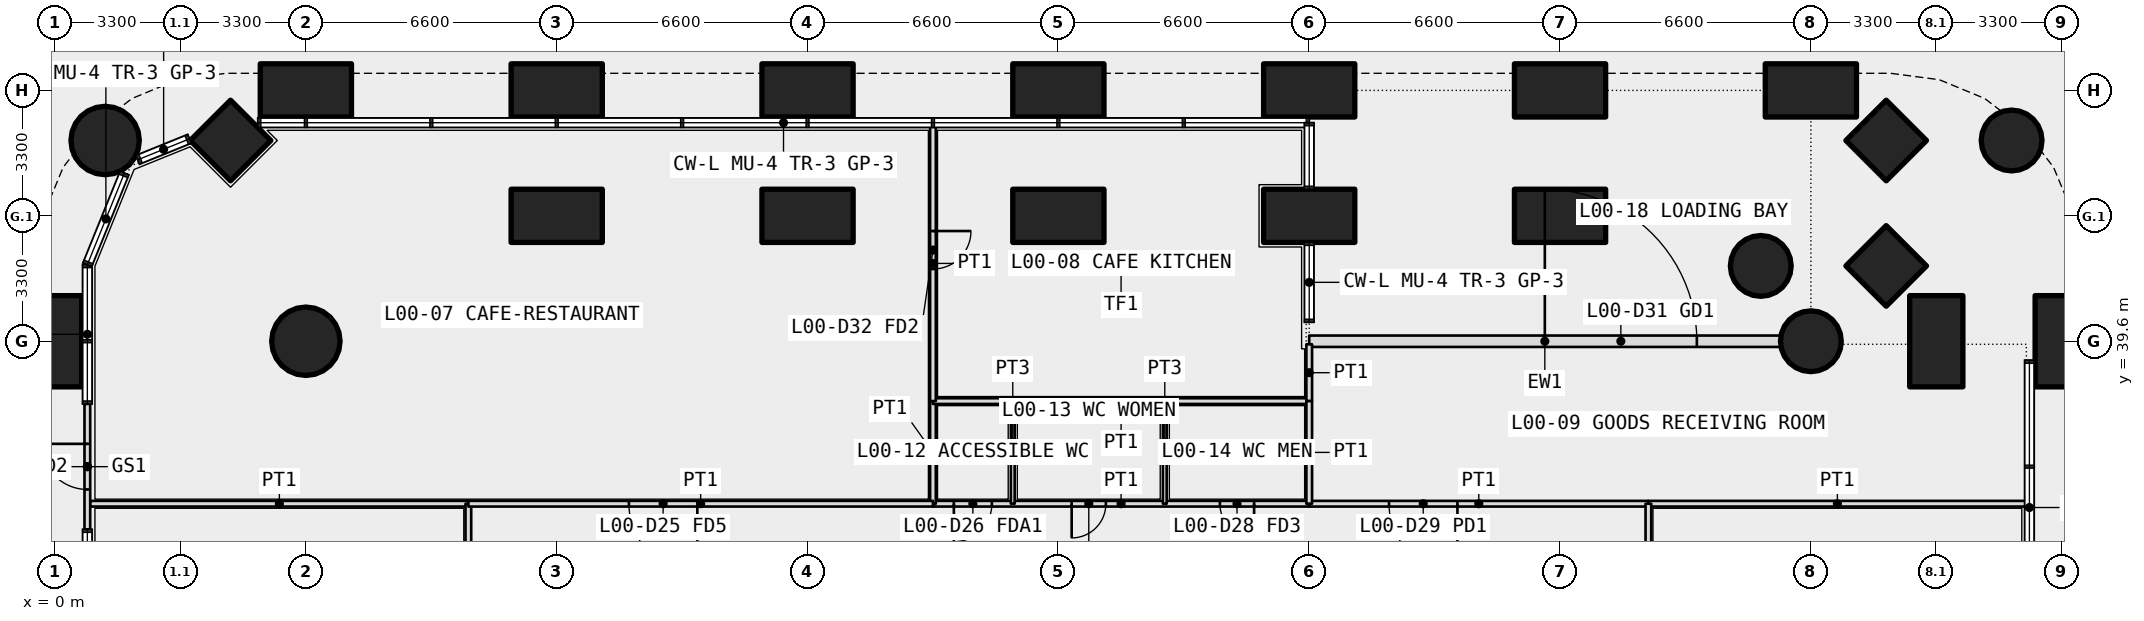
"""IFC4 building model, lengths in metres.
Left out: names, types, materials, properties, quantities, classifications, styles, units other than length and angle.
Written with IfcOpenShell. Run it as: python <this file> out.ifc"""

import sys

from ifc_helpers import new_model, si_unit, direction, frame, frame_2d, origin, origin_2d, place, context, subcontext, project, spatial, rectangle, circle, extrude, element, fill, save


model = new_model("IFC4")
c1 = context("Model", 3, precision=1e-05, world=origin(), true_north=direction((0.0, 1.0)))
c2 = subcontext(c1, "Body", "Model", "MODEL_VIEW")
j1 = project(units=[si_unit("LENGTHUNIT", "METRE"), si_unit("PLANEANGLEUNIT", "RADIAN")], contexts=[c1])
p1 = place(None, origin())
s1 = spatial("IfcSite", under=j1, at=p1, CompositionType="ELEMENT")
p2 = place(p1, origin())
s2 = spatial("IfcBuilding", under=s1, at=p2, CompositionType="ELEMENT")
p3 = place(p2, origin())
s3 = spatial("IfcBuildingStorey", under=s2, at=p3, CompositionType="ELEMENT", Elevation=0.0)
p4 = place(p3, frame((1.318, 44.882, 0.0), z_axis=(0.0, 0.0, 1.0), x_axis=(1.0, 0.0, 0.0)))
e1 = element("IfcColumn", 1, at=p4, inside=s3, PredefinedType="COLUMN", context=c2, shape_type="SweptSolid", body=[
    extrude(circle(Radius=0.9, at=origin_2d()), origin(), (0.0, 0.0, 1.0), 7.2),
])
p5 = place(p3, frame((51.482, 44.882, 0.0), z_axis=(0.0, 0.0, 1.0), x_axis=(1.0, 0.0, 0.0)))
e2 = element("IfcColumn", 2, at=p5, inside=s3, PredefinedType="COLUMN", context=c2, shape_type="SweptSolid", body=[
    extrude(circle(Radius=0.8, at=origin_2d()), origin(), (0.0, 0.0, 1.0), 7.2),
])
for number, where, z_axis, x_axis in (
    (3, (0.0, 39.6, 0.0), (0.0, 0.0, 1.0), (0.0, 1.0, 0.0)),
    (4, (52.8, 39.6, 0.0), (0.0, 0.0, 1.0), (0.0, 1.0, 0.0)),
    (5, (6.6, 46.2, 0.0), (0.0, 0.0, 1.0), (1.0, 0.0, 0.0)),
    (6, (13.2, 46.2, 0.0), (0.0, 0.0, 1.0), (1.0, 0.0, 0.0)),
    (7, (19.8, 46.2, 0.0), (0.0, 0.0, 1.0), (1.0, 0.0, 0.0)),
    (8, (26.4, 46.2, 0.0), (0.0, 0.0, 1.0), (1.0, 0.0, 0.0)),
    (9, (33.0, 46.2, 0.0), (0.0, 0.0, 1.0), (1.0, 0.0, 0.0)),
    (10, (39.6, 46.2, 0.0), (0.0, 0.0, 1.0), (1.0, 0.0, 0.0)),
    (11, (46.2, 46.2, 0.0), (0.0, 0.0, 1.0), (1.0, 0.0, 0.0)),
):
    element("IfcColumn", number, at=place(p3, frame(where, z_axis=z_axis, x_axis=x_axis)), inside=s3, PredefinedType="COLUMN", context=c2, shape_type="SweptSolid", body=[
        extrude(rectangle(XDim=2.4, YDim=1.4, at=origin_2d()), origin(), (0.0, 0.0, 1.0), 7.2),
    ])
p6 = place(p3, frame((6.6, 39.6, 0.0), z_axis=(0.0, 0.0, 1.0), x_axis=(1.0, 0.0, 0.0)))
e12 = element("IfcColumn", 12, at=p6, inside=s3, PredefinedType="COLUMN", context=c2, shape_type="SweptSolid", body=[
    extrude(circle(Radius=0.9, at=origin_2d()), origin(), (0.0, 0.0, 1.0), 7.2),
])
p7 = place(p3, frame((46.2, 39.6, 0.0), z_axis=(0.0, 0.0, 1.0), x_axis=(1.0, 0.0, 0.0)))
e13 = element("IfcColumn", 13, at=p7, inside=s3, PredefinedType="COLUMN", context=c2, shape_type="SweptSolid", body=[
    extrude(circle(Radius=0.8, at=origin_2d()), origin(), (0.0, 0.0, 1.0), 7.2),
])
for number, where, z_axis, x_axis in (
    (14, (4.618, 44.882, 0.0), (0.0, 0.0, 1.0), (0.707, 0.707, 0.0)),
    (15, (48.182, 44.882, 0.0), (0.0, 0.0, 1.0), (0.707, 0.707, 0.0)),
):
    element("IfcColumn", number, at=place(p3, frame(where, z_axis=z_axis, x_axis=x_axis)), inside=s3, PredefinedType="COLUMN", context=c2, shape_type="SweptSolid", body=[
        extrude(rectangle(XDim=1.5, YDim=1.5, at=origin_2d()), origin(), (0.0, 0.0, 1.0), 7.2),
    ])
p8 = place(p3, frame((49.5, 39.6, 0.0), z_axis=(0.0, 0.0, 1.0), x_axis=(0.0, 1.0, 0.0)))
e16 = element("IfcColumn", 16, at=p8, inside=s3, PredefinedType="COLUMN", context=c2, shape_type="SweptSolid", body=[
    extrude(rectangle(XDim=2.4, YDim=1.4, at=origin_2d()), origin(), (0.0, 0.0, 1.0), 7.2),
])
p9 = place(p3, frame((48.182, 41.582, 0.0), z_axis=(0.0, 0.0, 1.0), x_axis=(0.707106781187, 0.707106781187, 0.0)))
e17 = element("IfcColumn", 17, at=p9, inside=s3, PredefinedType="COLUMN", context=c2, shape_type="SweptSolid", body=[
    extrude(rectangle(XDim=1.5, YDim=1.5, at=origin_2d()), origin(), (0.0, 0.0, 1.0), 7.2),
])
for number, where, z_axis, x_axis in (
    (18, (13.2, 42.9, 0.0), (0.0, 0.0, 1.0), (1.0, 0.0, 0.0)),
    (19, (19.8, 42.9, 0.0), (0.0, 0.0, 1.0), (1.0, 0.0, 0.0)),
    (20, (26.4, 42.9, 0.0), (0.0, 0.0, 1.0), (1.0, 0.0, 0.0)),
    (21, (33.0, 42.9, 0.0), (0.0, 0.0, 1.0), (1.0, 0.0, 0.0)),
    (22, (39.6, 42.9, 0.0), (0.0, 0.0, 1.0), (1.0, 0.0, 0.0)),
):
    element("IfcColumn", number, at=place(p3, frame(where, z_axis=z_axis, x_axis=x_axis)), inside=s3, PredefinedType="COLUMN", context=c2, shape_type="SweptSolid", body=[
        extrude(rectangle(XDim=2.4, YDim=1.4, at=origin_2d()), origin(), (0.0, 0.0, 1.0), 7.2),
    ])
p10 = place(p3, frame((44.882, 41.582, 0.0), z_axis=(0.0, 0.0, 1.0), x_axis=(1.0, 0.0, 0.0)))
e23 = element("IfcColumn", 23, at=p10, inside=s3, PredefinedType="COLUMN", context=c2, shape_type="SweptSolid", body=[
    extrude(circle(Radius=0.8, at=origin_2d()), origin(), (0.0, 0.0, 1.0), 7.2),
])
p11 = place(p3, frame((0.85, 34.65, 0.0), z_axis=(0.0, 0.0, 1.0), x_axis=(0.0, 1.0, 0.0)))
e24 = element("IfcWall", 24, at=p11, inside=s3, PredefinedType="SOLIDWALL", context=c2, shape_type="SweptSolid", body=[
    extrude(rectangle(XDim=3.3, YDim=0.15, at=frame_2d((1.65, 0.0))), origin(), (0.0, 0.0, 1.0), 6.9),
])
p12 = place(p11, frame((1.05, 0.0, 0.0)))
e25 = element("IfcOpeningElement", 25, at=p12, cuts=e24, PredefinedType="OPENING", context=c2, shape_type="SweptSolid", body=[
    extrude(rectangle(XDim=1.2, YDim=2.4, at=frame_2d((0.6, 1.2))), frame((0.0, 0.085, 0.0), z_axis=(0.0, -1.0, 0.0), x_axis=(1.0, 0.0, 0.0)), (0.0, 0.0, 1.0), 0.17),
])
p13 = place(p3, frame((33.0, 39.6, 0.0), z_axis=(0.0, 0.0, 1.0), x_axis=(1.0, 0.0, 0.0)))
e26 = element("IfcWall", 26, at=p13, inside=s3, PredefinedType="SOLIDWALL", context=c2, shape_type="SweptSolid", body=[
    extrude(rectangle(XDim=12.4, YDim=0.3, at=frame_2d((6.2, 0.0))), origin(), (0.0, 0.0, 1.0), 5.85),
])
p14 = place(p13, frame((6.2, 0.0, 0.0)))
e27 = element("IfcOpeningElement", 27, at=p14, cuts=e26, PredefinedType="OPENING", context=c2, shape_type="SweptSolid", body=[
    extrude(rectangle(XDim=4.0, YDim=4.5, at=frame_2d((2.0, 2.25))), frame((0.0, 0.16, 0.0), z_axis=(0.0, -1.0, 0.0), x_axis=(1.0, 0.0, 0.0)), (0.0, 0.0, 1.0), 0.32),
])
p15 = place(p3, frame((33.0, 35.325, 0.0), z_axis=(0.0, 0.0, 1.0), x_axis=(-1.0, 0.0, 0.0)))
e28 = element("IfcWall", 28, at=p15, inside=s3, PredefinedType="PARTITIONING", context=c2, shape_type="SweptSolid", body=[
    extrude(rectangle(XDim=9.9, YDim=0.15, at=frame_2d((4.95, 0.0))), origin(), (0.0, 0.0, 1.0), 5.85),
])
p16 = place(p15, frame((8.35, 0.0, 0.0)))
e29 = element("IfcOpeningElement", 29, at=p16, cuts=e28, PredefinedType="OPENING", context=c2, shape_type="SweptSolid", body=[
    extrude(rectangle(XDim=1.0, YDim=2.1, at=frame_2d((0.5, 1.05))), frame((0.0, 0.085, 0.0), z_axis=(0.0, -1.0, 0.0), x_axis=(1.0, 0.0, 0.0)), (0.0, 0.0, 1.0), 0.17),
])
p17 = place(p15, frame((5.35, 0.0, 0.0)))
e30 = element("IfcOpeningElement", 30, at=p17, cuts=e28, PredefinedType="OPENING", context=c2, shape_type="SweptSolid", body=[
    extrude(rectangle(XDim=0.9, YDim=2.1, at=frame_2d((0.45, 1.05))), frame((0.0, 0.085, 0.0), z_axis=(0.0, -1.0, 0.0), x_axis=(1.0, 0.0, 0.0)), (0.0, 0.0, 1.0), 0.17),
])
p18 = place(p15, frame((1.45, 0.0, 0.0)))
e31 = element("IfcOpeningElement", 31, at=p18, cuts=e28, PredefinedType="OPENING", context=c2, shape_type="SweptSolid", body=[
    extrude(rectangle(XDim=0.9, YDim=2.1, at=frame_2d((0.45, 1.05))), frame((0.0, 0.085, 0.0), z_axis=(0.0, -1.0, 0.0), x_axis=(1.0, 0.0, 0.0)), (0.0, 0.0, 1.0), 0.17),
])
for number, where, z_axis, x_axis in (
    (32, (25.2, 35.325, 0.0), (0.0, 0.0, 1.0), (0.0, 1.0, 0.0)),
    (33, (29.2, 35.325, 0.0), (0.0, 0.0, 1.0), (0.0, 1.0, 0.0)),
):
    element("IfcWall", number, at=place(p3, frame(where, z_axis=z_axis, x_axis=x_axis)), inside=s3, PredefinedType="PARTITIONING", context=c2, shape_type="SweptSolid", body=[
        extrude(rectangle(XDim=2.7, YDim=0.1, at=frame_2d((1.35, 0.0))), origin(), (0.0, 0.0, 1.0), 6.9),
    ])
p19 = place(p3, frame((0.93, 35.325, 0.0), z_axis=(0.0, 0.0, 1.0), x_axis=(1.0, 0.0, 0.0)))
e34 = element("IfcWall", 34, at=p19, inside=s3, PredefinedType="PARTITIONING", context=c2, shape_type="SweptSolid", body=[
    extrude(rectangle(XDim=9.945, YDim=0.15, at=frame_2d((4.973, 0.0))), origin(), (0.0, 0.0, 1.0), 5.85),
])
p20 = place(p3, frame((10.875, 35.325, 0.0), z_axis=(0.0, 0.0, 1.0), x_axis=(0.0, -1.0, 0.0)))
e35 = element("IfcWall", 35, at=p20, inside=s3, PredefinedType="PARTITIONING", context=c2, shape_type="SweptSolid", body=[
    extrude(rectangle(XDim=8.925, YDim=0.15, at=frame_2d((4.462, 0.0))), origin(), (0.0, 0.0, 1.0), 5.85),
])
p21 = place(p20, frame((3.825, 0.0, 0.0)))
e36 = element("IfcOpeningElement", 36, at=p21, cuts=e35, PredefinedType="OPENING", context=c2, shape_type="SweptSolid", body=[
    extrude(rectangle(XDim=1.0, YDim=2.1, at=frame_2d((0.5, 1.05))), frame((0.0, 0.085, 0.0), z_axis=(0.0, -1.0, 0.0), x_axis=(1.0, 0.0, 0.0)), (0.0, 0.0, 1.0), 0.17),
])
p22 = place(p3, frame((23.1, 38.025, 0.0), z_axis=(0.0, 0.0, 1.0), x_axis=(0.0, -1.0, 0.0)))
e37 = element("IfcWall", 37, at=p22, inside=s3, PredefinedType="PARTITIONING", context=c2, shape_type="SweptSolid", body=[
    extrude(rectangle(XDim=2.7, YDim=0.15, at=frame_2d((1.35, 0.0))), origin(), (0.0, 0.0, 1.0), 6.9),
])
p23 = place(p3, frame((23.1, 35.325, 0.0), z_axis=(0.0, 0.0, 1.0), x_axis=(-1.0, 0.0, 0.0)))
e38 = element("IfcWall", 38, at=p23, inside=s3, PredefinedType="PARTITIONING", context=c2, shape_type="SweptSolid", body=[
    extrude(rectangle(XDim=12.225, YDim=0.15, at=frame_2d((6.113, 0.0))), origin(), (0.0, 0.0, 1.0), 4.5),
])
p24 = place(p23, frame((6.2, 0.0, 0.0)))
e39 = element("IfcOpeningElement", 39, at=p24, cuts=e38, PredefinedType="OPENING", context=c2, shape_type="SweptSolid", body=[
    extrude(rectangle(XDim=1.8, YDim=2.1, at=frame_2d((0.9, 1.05))), frame((0.0, 0.085, 0.0), z_axis=(0.0, -1.0, 0.0), x_axis=(1.0, 0.0, 0.0)), (0.0, 0.0, 1.0), 0.17),
])
p25 = place(p3, frame((33.0, 38.025, 0.0), z_axis=(0.0, 0.0, 1.0), x_axis=(-1.0, 0.0, 0.0)))
e40 = element("IfcWall", 40, at=p25, inside=s3, PredefinedType="PARTITIONING", context=c2, shape_type="SweptSolid", body=[
    extrude(rectangle(XDim=9.9, YDim=0.15, at=frame_2d((4.95, 0.0))), origin(), (0.0, 0.0, 1.0), 5.85),
])
p26 = place(p3, frame((23.1, 45.27, 0.0), z_axis=(0.0, 0.0, 1.0), x_axis=(0.0, -1.0, 0.0)))
e41 = element("IfcWall", 41, at=p26, inside=s3, PredefinedType="PARTITIONING", context=c2, shape_type="SweptSolid", body=[
    extrude(rectangle(XDim=7.245, YDim=0.15, at=frame_2d((3.623, 0.0))), origin(), (0.0, 0.0, 1.0), 6.9),
])
p27 = place(p26, frame((2.77, 0.0, 0.0)))
e42 = element("IfcOpeningElement", 42, at=p27, cuts=e41, PredefinedType="OPENING", context=c2, shape_type="SweptSolid", body=[
    extrude(rectangle(XDim=1.0, YDim=2.1, at=frame_2d((0.5, 1.05))), frame((0.0, 0.085, 0.0), z_axis=(0.0, -1.0, 0.0), x_axis=(1.0, 0.0, 0.0)), (0.0, 0.0, 1.0), 0.17),
])
p28 = place(p3, frame((33.0, 39.52, 0.0), z_axis=(0.0, 0.0, 1.0), x_axis=(0.0, -1.0, 0.0)))
e43 = element("IfcWall", 43, at=p28, inside=s3, PredefinedType="PARTITIONING", context=c2, shape_type="SweptSolid", body=[
    extrude(rectangle(XDim=1.495, YDim=0.15, at=frame_2d((0.748, 0.0))), origin(), (0.0, 0.0, 1.0), 5.85),
])
p29 = place(p3, frame((41.925, 35.325, 0.0), z_axis=(0.0, 0.0, 1.0), x_axis=(-1.0, 0.0, 0.0)))
e44 = element("IfcWall", 44, at=p29, inside=s3, PredefinedType="PARTITIONING", context=c2, shape_type="SweptSolid", body=[
    extrude(rectangle(XDim=8.925, YDim=0.15, at=frame_2d((4.462, 0.0))), origin(), (0.0, 0.0, 1.0), 5.85),
])
p30 = place(p29, frame((5.025, 0.0, 0.0)))
e45 = element("IfcOpeningElement", 45, at=p30, cuts=e44, PredefinedType="OPENING", context=c2, shape_type="SweptSolid", body=[
    extrude(rectangle(XDim=1.8, YDim=2.4, at=frame_2d((0.9, 1.2))), frame((0.0, 0.085, 0.0), z_axis=(0.0, -1.0, 0.0), x_axis=(1.0, 0.0, 0.0)), (0.0, 0.0, 1.0), 0.17),
])
p31 = place(p3, frame((33.0, 35.325, 0.0), z_axis=(0.0, 0.0, 1.0), x_axis=(0.0, 1.0, 0.0)))
e46 = element("IfcWall", 46, at=p31, inside=s3, PredefinedType="PARTITIONING", context=c2, shape_type="SweptSolid", body=[
    extrude(rectangle(XDim=2.7, YDim=0.15, at=frame_2d((1.35, 0.0))), origin(), (0.0, 0.0, 1.0), 5.85),
])
p32 = place(p3, frame((51.87, 35.325, 0.0), z_axis=(0.0, 0.0, 1.0), x_axis=(-1.0, 0.0, 0.0)))
e47 = element("IfcWall", 47, at=p32, inside=s3, PredefinedType="PARTITIONING", context=c2, shape_type="SweptSolid", body=[
    extrude(rectangle(XDim=9.945, YDim=0.15, at=frame_2d((4.973, 0.0))), origin(), (0.0, 0.0, 1.0), 5.85),
])
p33 = place(p3, frame((41.925, 26.4, 0.0), z_axis=(0.0, 0.0, 1.0), x_axis=(0.0, 1.0, 0.0)))
e48 = element("IfcWall", 48, at=p33, inside=s3, PredefinedType="PARTITIONING", context=c2, shape_type="SweptSolid", body=[
    extrude(rectangle(XDim=8.925, YDim=0.15, at=frame_2d((4.462, 0.0))), origin(), (0.0, 0.0, 1.0), 4.5),
])
p34 = place(p33, frame((4.2, 0.0, 0.0)))
e49 = element("IfcOpeningElement", 49, at=p34, cuts=e48, PredefinedType="OPENING", context=c2, shape_type="SweptSolid", body=[
    extrude(rectangle(XDim=1.8, YDim=2.1, at=frame_2d((0.9, 1.05))), frame((0.0, 0.085, 0.0), z_axis=(0.0, -1.0, 0.0), x_axis=(1.0, 0.0, 0.0)), (0.0, 0.0, 1.0), 0.17),
])
p35 = place(p12, origin())
e50 = element("IfcDoor", 50, at=p35, inside=s3, OperationType="SINGLE_SWING_RIGHT", PredefinedType="DOOR", context=c2, shape_type="SweptSolid", body=[
    extrude(rectangle(XDim=1.2, YDim=2.4, at=frame_2d((0.6, 1.2))), frame((0.0, 0.025, 0.0), z_axis=(0.0, -1.0, 0.0), x_axis=(1.0, 0.0, 0.0)), (0.0, 0.0, 1.0), 0.05),
])
fill(e25, e50)
p36 = place(p14, origin())
e51 = element("IfcDoor", 51, at=p36, inside=s3, OperationType="ROLLINGUP", PredefinedType="DOOR", context=c2, shape_type="SweptSolid", body=[
    extrude(rectangle(XDim=4.0, YDim=4.5, at=frame_2d((2.0, 2.25))), frame((0.0, 0.025, 0.0), z_axis=(0.0, -1.0, 0.0), x_axis=(1.0, 0.0, 0.0)), (0.0, 0.0, 1.0), 0.05),
])
fill(e27, e51)
p37 = place(p16, origin())
e52 = element("IfcDoor", 52, at=p37, inside=s3, OperationType="SINGLE_SWING_RIGHT", PredefinedType="DOOR", context=c2, shape_type="SweptSolid", body=[
    extrude(rectangle(XDim=1.0, YDim=2.1, at=frame_2d((0.5, 1.05))), frame((0.0, 0.025, 0.0), z_axis=(0.0, -1.0, 0.0), x_axis=(1.0, 0.0, 0.0)), (0.0, 0.0, 1.0), 0.05),
])
fill(e29, e52)
p38 = place(p17, origin())
e53 = element("IfcDoor", 53, at=p38, inside=s3, OperationType="SINGLE_SWING_RIGHT", PredefinedType="DOOR", context=c2, shape_type="SweptSolid", body=[
    extrude(rectangle(XDim=0.9, YDim=2.1, at=frame_2d((0.45, 1.05))), frame((0.0, 0.025, 0.0), z_axis=(0.0, -1.0, 0.0), x_axis=(1.0, 0.0, 0.0)), (0.0, 0.0, 1.0), 0.05),
])
fill(e30, e53)
p39 = place(p18, origin())
e54 = element("IfcDoor", 54, at=p39, inside=s3, OperationType="SINGLE_SWING_LEFT", PredefinedType="DOOR", context=c2, shape_type="SweptSolid", body=[
    extrude(rectangle(XDim=0.9, YDim=2.1, at=frame_2d((0.45, 1.05))), frame((0.0, 0.025, 0.0), z_axis=(0.0, -1.0, 0.0), x_axis=(1.0, 0.0, 0.0)), (0.0, 0.0, 1.0), 0.05),
])
fill(e31, e54)
p40 = place(p24, origin())
e55 = element("IfcDoor", 55, at=p40, inside=s3, OperationType="DOUBLE_DOOR_DOUBLE_SWING", PredefinedType="DOOR", context=c2, shape_type="SweptSolid", body=[
    extrude(rectangle(XDim=1.8, YDim=2.1, at=frame_2d((0.9, 1.05))), frame((0.0, 0.025, 0.0), z_axis=(0.0, -1.0, 0.0), x_axis=(1.0, 0.0, 0.0)), (0.0, 0.0, 1.0), 0.05),
])
fill(e39, e55)
p41 = place(p27, origin())
e56 = element("IfcDoor", 56, at=p41, inside=s3, OperationType="SINGLE_SWING_LEFT", PredefinedType="DOOR", context=c2, shape_type="SweptSolid", body=[
    extrude(rectangle(XDim=1.0, YDim=2.1, at=frame_2d((0.5, 1.05))), frame((0.0, 0.025, 0.0), z_axis=(0.0, -1.0, 0.0), x_axis=(1.0, 0.0, 0.0)), (0.0, 0.0, 1.0), 0.05),
])
fill(e42, e56)
p42 = place(p30, origin())
e57 = element("IfcDoor", 57, at=p42, inside=s3, OperationType="DOUBLE_DOOR_SINGLE_SWING", PredefinedType="DOOR", context=c2, shape_type="SweptSolid", body=[
    extrude(rectangle(XDim=1.8, YDim=2.4, at=frame_2d((0.9, 1.2))), frame((0.0, 0.025, 0.0), z_axis=(0.0, -1.0, 0.0), x_axis=(1.0, 0.0, 0.0)), (0.0, 0.0, 1.0), 0.05),
])
fill(e45, e57)
save(model, sys.argv[1])
